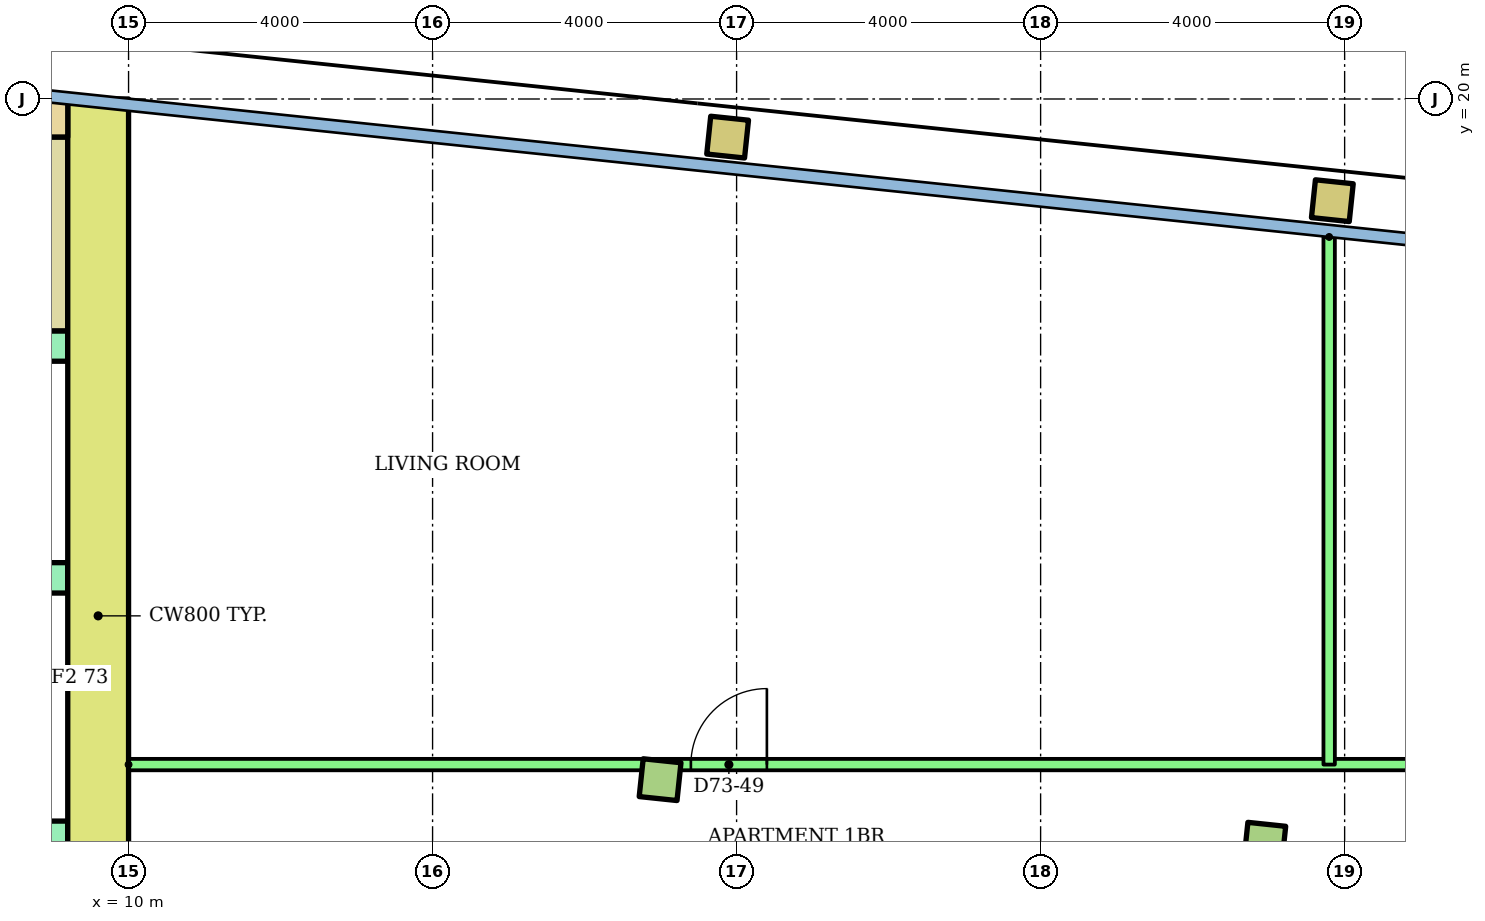
"""IFC4 building model, lengths in metres.
Left out: names, types, materials, properties, quantities, classifications, styles, units other than length and angle.
Written with IfcOpenShell. Run it as: python <this file> out.ifc"""

import sys

from ifc_helpers import new_model, si_unit, direction, frame, frame_2d, origin, origin_2d, place, context, subcontext, project, spatial, rectangle, hollow_rectangle, extrude, element, fill, save


model = new_model("IFC4")
c1 = context("Model", 3, precision=1e-05, world=origin(), true_north=direction((0.0, 1.0)))
c2 = subcontext(c1, "Body", "Model", "MODEL_VIEW")
j1 = project(units=[si_unit("LENGTHUNIT", "METRE"), si_unit("PLANEANGLEUNIT", "RADIAN")], contexts=[c1])
p1 = place(None, origin())
s1 = spatial("IfcSite", under=j1, at=p1, CompositionType="ELEMENT")
p2 = place(p1, origin())
s2 = spatial("IfcBuilding", under=s1, at=p2, CompositionType="ELEMENT")
p3 = place(p2, frame((0.0, 0.0, 278.7)))
s3 = spatial("IfcBuildingStorey", under=s2, at=p3, CompositionType="ELEMENT", Elevation=278.7)
for number, where, z_axis, x_axis in (
    (1, (16.993, 11.045, 0.0), (0.0, 0.0, 1.0), (0.995, -0.105, 0.0)),
    (2, (24.95, 10.209, 0.0), (0.0, 0.0, 1.0), (0.995, -0.105, 0.0)),
):
    element("IfcColumn", number, at=place(p3, frame(where, z_axis=z_axis, x_axis=x_axis)), inside=s3, PredefinedType="COLUMN", context=c2, shape_type="SweptSolid", body=[
        extrude(rectangle(XDim=0.5, YDim=0.5, at=origin_2d()), origin(), (0.0, 0.0, 1.0), 3.2),
    ])
for number, where, z_axis, x_axis in (
    (3, (17.882, 19.498, 0.0), (0.0, 0.0, 1.0), (0.995, -0.105, 0.0)),
    (4, (25.838, 18.662, 0.0), (0.0, 0.0, 1.0), (0.995, -0.105, 0.0)),
):
    element("IfcColumn", number, at=place(p3, frame(where, z_axis=z_axis, x_axis=x_axis)), inside=s3, PredefinedType="COLUMN", context=c2, shape_type="SweptSolid", body=[
        extrude(hollow_rectangle(XDim=0.5, YDim=0.5, WallThickness=0.025, at=origin_2d()), origin(), (0.0, 0.0, 1.0), 3.2),
    ])
p4 = place(p3, frame((9.6, 6.4, 0.0), z_axis=(0.0, 0.0, 1.0), x_axis=(0.0, 1.0, 0.0)))
e5 = element("IfcWall", 5, at=p4, inside=s3, PredefinedType="SHEAR", context=c2, shape_type="SweptSolid", body=[
    extrude(rectangle(XDim=13.6, YDim=0.8, at=frame_2d((6.8, 0.0))), origin(), (0.0, 0.0, 1.0), 2.8),
])
p5 = place(p3, frame((-9.2, 19.75, 0.0)))
e6 = element("IfcWall", 6, at=p5, inside=s3, PredefinedType="SHEAR", context=c2, shape_type="SweptSolid", body=[
    extrude(rectangle(XDim=18.4, YDim=0.5, at=frame_2d((9.2, 0.0))), origin(), (0.0, 0.0, 1.0), 2.8),
])
p6 = place(p3, frame((1.2, 10.3, 0.0)))
e7 = element("IfcWall", 7, at=p6, inside=s3, PredefinedType="SHEAR", context=c2, shape_type="SweptSolid", body=[
    extrude(rectangle(XDim=8.0, YDim=0.4, at=frame_2d((4.0, 0.0))), origin(), (0.0, 0.0, 1.0), 2.8),
])
p7 = place(p6, frame((0.817, 0.0, 0.0)))
e8 = element("IfcOpeningElement", 8, at=p7, cuts=e7, PredefinedType="OPENING", context=c2, shape_type="SweptSolid", body=[
    extrude(rectangle(XDim=1.1, YDim=2.1, at=frame_2d((0.55, 1.05))), frame((0.0, 0.21, 0.0), z_axis=(0.0, -1.0, 0.0), x_axis=(1.0, 0.0, 0.0)), (0.0, 0.0, 1.0), 0.42),
])
p8 = place(p6, frame((3.55, 0.0, 0.0)))
e9 = element("IfcOpeningElement", 9, at=p8, cuts=e7, PredefinedType="OPENING", context=c2, shape_type="SweptSolid", body=[
    extrude(rectangle(XDim=1.1, YDim=2.1, at=frame_2d((0.55, 1.05))), frame((0.0, 0.21, 0.0), z_axis=(0.0, -1.0, 0.0), x_axis=(1.0, 0.0, 0.0)), (0.0, 0.0, 1.0), 0.42),
])
p9 = place(p6, frame((6.283, 0.0, 0.0)))
e10 = element("IfcOpeningElement", 10, at=p9, cuts=e7, PredefinedType="OPENING", context=c2, shape_type="SweptSolid", body=[
    extrude(rectangle(XDim=1.1, YDim=2.1, at=frame_2d((0.55, 1.05))), frame((0.0, 0.21, 0.0), z_axis=(0.0, -1.0, 0.0), x_axis=(1.0, 0.0, 0.0)), (0.0, 0.0, 1.0), 0.42),
])
p10 = place(p3, frame((1.2, 13.7, 0.0)))
e11 = element("IfcWall", 11, at=p10, inside=s3, PredefinedType="SHEAR", context=c2, shape_type="SweptSolid", body=[
    extrude(rectangle(XDim=8.0, YDim=0.4, at=frame_2d((4.0, 0.0))), origin(), (0.0, 0.0, 1.0), 2.8),
])
p11 = place(p3, frame((-9.2, 16.75, 0.0)))
e12 = element("IfcWall", 12, at=p11, inside=s3, PredefinedType="SHEAR", context=c2, shape_type="SweptSolid", body=[
    extrude(rectangle(XDim=18.4, YDim=0.4, at=frame_2d((9.2, 0.0))), origin(), (0.0, 0.0, 1.0), 2.8),
])
p12 = place(p11, frame((0.1, 0.0, 0.0)))
e13 = element("IfcOpeningElement", 13, at=p12, cuts=e12, PredefinedType="OPENING", context=c2, shape_type="SweptSolid", body=[
    extrude(rectangle(XDim=0.95, YDim=2.1, at=frame_2d((0.475, 1.05))), frame((0.0, 0.21, 0.0), z_axis=(0.0, -1.0, 0.0), x_axis=(1.0, 0.0, 0.0)), (0.0, 0.0, 1.0), 0.42),
])
p13 = place(p11, frame((6.1, 0.0, 0.0)))
e14 = element("IfcOpeningElement", 14, at=p13, cuts=e12, PredefinedType="OPENING", context=c2, shape_type="SweptSolid", body=[
    extrude(rectangle(XDim=0.95, YDim=2.1, at=frame_2d((0.475, 1.05))), frame((0.0, 0.21, 0.0), z_axis=(0.0, -1.0, 0.0), x_axis=(1.0, 0.0, 0.0)), (0.0, 0.0, 1.0), 0.42),
])
p14 = place(p11, frame((12.1, 0.0, 0.0)))
e15 = element("IfcOpeningElement", 15, at=p14, cuts=e12, PredefinedType="OPENING", context=c2, shape_type="SweptSolid", body=[
    extrude(rectangle(XDim=0.95, YDim=2.1, at=frame_2d((0.475, 1.05))), frame((0.0, 0.21, 0.0), z_axis=(0.0, -1.0, 0.0), x_axis=(1.0, 0.0, 0.0)), (0.0, 0.0, 1.0), 0.42),
])
p15 = place(p3, frame((8.75, 16.95, 0.0), z_axis=(0.0, 0.0, 1.0), x_axis=(0.0, 1.0, 0.0)))
e16 = element("IfcWall", 16, at=p15, inside=s3, PredefinedType="SHEAR", context=c2, shape_type="SweptSolid", body=[
    extrude(rectangle(XDim=2.55, YDim=0.9, at=frame_2d((1.275, 0.0))), origin(), (0.0, 0.0, 1.0), 2.8),
])
p16 = place(p3, frame((10.0, 11.243, 0.0)))
e17 = element("IfcWall", 17, at=p16, inside=s3, PredefinedType="PARTITIONING", context=c2, shape_type="SweptSolid", body=[
    extrude(rectangle(XDim=22.118, YDim=0.15, at=frame_2d((11.059, 0.0))), origin(), (0.0, 0.0, 1.0), 2.4),
])
p17 = place(p16, frame((7.398, 0.0, 0.0)))
e18 = element("IfcOpeningElement", 18, at=p17, cuts=e17, PredefinedType="OPENING", context=c2, shape_type="SweptSolid", body=[
    extrude(rectangle(XDim=1.0, YDim=2.1, at=frame_2d((0.5, 1.05))), frame((0.0, 0.085, 0.0), z_axis=(0.0, -1.0, 0.0), x_axis=(1.0, 0.0, 0.0)), (0.0, 0.0, 1.0), 0.17),
])
p18 = place(p16, frame((18.477, 0.0, 0.0)))
e19 = element("IfcOpeningElement", 19, at=p18, cuts=e17, PredefinedType="OPENING", context=c2, shape_type="SweptSolid", body=[
    extrude(rectangle(XDim=0.9, YDim=2.1, at=frame_2d((0.45, 1.05))), frame((0.0, 0.085, 0.0), z_axis=(0.0, -1.0, 0.0), x_axis=(1.0, 0.0, 0.0)), (0.0, 0.0, 1.0), 0.17),
])
p19 = place(p3, frame((25.796, 18.185, 0.0), z_axis=(0.0, 0.0, 1.0), x_axis=(0.0, -1.0, 0.0)))
e20 = element("IfcWall", 20, at=p19, inside=s3, PredefinedType="PARTITIONING", context=c2, shape_type="SweptSolid", body=[
    extrude(rectangle(XDim=6.941, YDim=0.15, at=frame_2d((3.471, 0.0))), origin(), (0.0, 0.0, 1.0), 2.4),
])
p20 = place(p17, origin())
e21 = element("IfcDoor", 21, at=p20, inside=s3, OperationType="SINGLE_SWING_RIGHT", PredefinedType="DOOR", context=c2, shape_type="SweptSolid", body=[
    extrude(rectangle(XDim=1.0, YDim=2.1, at=frame_2d((0.5, 1.05))), frame((0.0, 0.025, 0.0), z_axis=(0.0, -1.0, 0.0), x_axis=(1.0, 0.0, 0.0)), (0.0, 0.0, 1.0), 0.05),
])
fill(e18, e21)
save(model, sys.argv[1])
